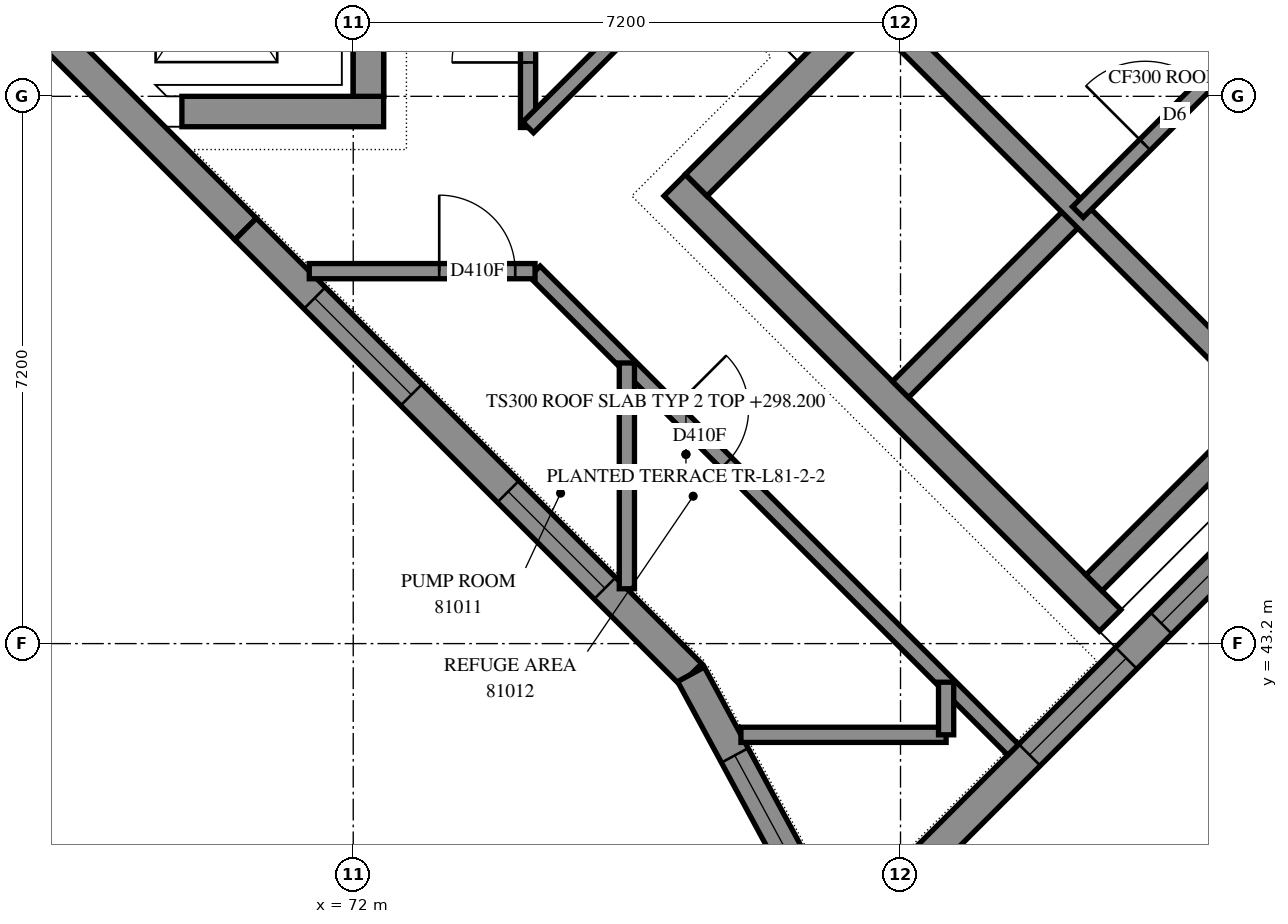
"""IFC4 building model, lengths in metres.
Left out: names, types, materials, properties, quantities, classifications, styles, units other than length and angle.
Written with IfcOpenShell. Run it as: python <this file> out.ifc"""

import sys

from ifc_helpers import new_model, si_unit, direction, frame, frame_2d, origin, place, context, subcontext, project, spatial, polyline, rectangle, outline, extrude, element, fill, save


model = new_model("IFC4")
c1 = context("Model", 3, precision=1e-05, world=origin(), true_north=direction((0.0, 1.0)))
c2 = subcontext(c1, "Body", "Model", "MODEL_VIEW")
j1 = project(units=[si_unit("LENGTHUNIT", "METRE"), si_unit("PLANEANGLEUNIT", "RADIAN")], contexts=[c1])
p1 = place(None, origin())
s1 = spatial("IfcSite", under=j1, at=p1, CompositionType="ELEMENT")
p2 = place(p1, origin())
s2 = spatial("IfcBuilding", under=s1, at=p2, CompositionType="ELEMENT")
p3 = place(p2, frame((0.0, 0.0, 298.2)))
s3 = spatial("IfcBuildingStorey", under=s2, at=p3, CompositionType="ELEMENT", Elevation=298.2)
p4 = place(p3, frame((69.746, 50.2, -0.3), z_axis=(0.0, 0.0, 1.0), x_axis=(1.0, 0.0, 0.0)))
e1 = element("IfcWall", 1, at=p4, inside=s3, PredefinedType="SHEAR", context=c2, shape_type="SweptSolid", body=[
    extrude(outline(polyline([(0.0, 0.0), (2.654, 0.0), (2.654, 3.1), (0.0, 3.1), (0.0, 0.0)])), frame((0.0, 0.2, 0.0), z_axis=(0.0, -1.0, 0.0), x_axis=(1.0, 0.0, 0.0)), (0.0, 0.0, 1.0), 0.4),
])
p5 = place(p3, frame((72.2, 50.4, -0.3), z_axis=(0.0, 0.0, 1.0), x_axis=(0.0, 1.0, 0.0)))
e2 = element("IfcWall", 2, at=p5, inside=s3, PredefinedType="SHEAR", context=c2, shape_type="SweptSolid", body=[
    extrude(outline(polyline([(0.0, 0.0), (14.4, 0.0), (14.4, 3.1), (0.0, 3.1), (0.0, 0.0)])), frame((0.0, 0.2, 0.0), z_axis=(0.0, -1.0, 0.0), x_axis=(1.0, 0.0, 0.0)), (0.0, 0.0, 1.0), 0.4),
])
p6 = place(p5, frame((4.55, 0.0, 0.3)))
e3 = element("IfcOpeningElement", 3, at=p6, cuts=e2, PredefinedType="OPENING", context=c2, shape_type="SweptSolid", body=[
    extrude(rectangle(XDim=1.1, YDim=2.1, at=frame_2d((0.55, 1.05))), frame((0.0, 0.21, 0.0), z_axis=(0.0, -1.0, 0.0), x_axis=(1.0, 0.0, 0.0)), (0.0, 0.0, 1.0), 0.42),
])
p7 = place(p5, frame((11.35, 0.0, 0.3)))
e4 = element("IfcOpeningElement", 4, at=p7, cuts=e2, PredefinedType="OPENING", context=c2, shape_type="SweptSolid", body=[
    extrude(rectangle(XDim=1.1, YDim=2.1, at=frame_2d((0.55, 1.05))), frame((0.0, 0.21, 0.0), z_axis=(0.0, -1.0, 0.0), x_axis=(1.0, 0.0, 0.0)), (0.0, 0.0, 1.0), 0.42),
])
p8 = place(p3, frame((76.23, 49.231, -0.3), z_axis=(0.0, 0.0, 1.0), x_axis=(0.7071006083, -0.707112954, 0.0)))
e5 = element("IfcWall", 5, at=p8, inside=s3, PredefinedType="SHEAR", context=c2, shape_type="SweptSolid", body=[
    extrude(outline(polyline([(0.0, 0.0), (8.1, 0.0), (8.1, 3.1), (0.0, 3.1), (0.0, 0.0)])), frame((0.0, 0.2, 0.0), z_axis=(0.0, -1.0, 0.0), x_axis=(1.0, 0.0, 0.0)), (0.0, 0.0, 1.0), 0.4),
])
p9 = place(p3, frame((76.513, 49.231, -0.3), z_axis=(0.0, 0.0, 1.0), x_axis=(0.7071067812, 0.7071067812, 0.0)))
e6 = element("IfcWall", 6, at=p9, inside=s3, PredefinedType="SHEAR", context=c2, shape_type="SweptSolid", body=[
    extrude(outline(polyline([(0.0, 0.0), (14.4, 0.0), (14.4, 3.1), (0.0, 3.1), (0.0, 0.0)])), frame((0.0, 0.2, 0.0), z_axis=(0.0, -1.0, 0.0), x_axis=(1.0, 0.0, 0.0)), (0.0, 0.0, 1.0), 0.4),
])
p10 = place(p9, frame((4.55, 0.0, 0.3)))
e7 = element("IfcOpeningElement", 7, at=p10, cuts=e6, PredefinedType="OPENING", context=c2, shape_type="SweptSolid", body=[
    extrude(rectangle(XDim=1.1, YDim=2.1, at=frame_2d((0.55, 1.05))), frame((0.0, 0.21, 0.0), z_axis=(0.0, -1.0, 0.0), x_axis=(1.0, 0.0, 0.0)), (0.0, 0.0, 1.0), 0.42),
])
p11 = place(p9, frame((11.35, 0.0, 0.3)))
e8 = element("IfcOpeningElement", 8, at=p11, cuts=e6, PredefinedType="OPENING", context=c2, shape_type="SweptSolid", body=[
    extrude(rectangle(XDim=1.1, YDim=2.1, at=frame_2d((0.55, 1.05))), frame((0.0, 0.21, 0.0), z_axis=(0.0, -1.0, 0.0), x_axis=(1.0, 0.0, 0.0)), (0.0, 0.0, 1.0), 0.42),
])
p12 = place(p3, frame((79.2, 46.544, 0.0), z_axis=(0.0, 0.0, 1.0), x_axis=(0.7071219326, 0.7070916295, 0.0)))
e9 = element("IfcWall", 9, at=p12, inside=s3, PredefinedType="SOLIDWALL", context=c2, shape_type="SweptSolid", body=[
    extrude(outline(polyline([(0.0, 0.0), (3.3, 0.0), (3.3, 3.5), (0.0, 3.5), (0.0, 0.0)])), frame((0.0, 0.15, 0.0), z_axis=(0.0, -1.0, 0.0), x_axis=(1.0, 0.0, 0.0)), (0.0, 0.0, 1.0), 0.3),
])
p13 = place(p3, frame((81.746, 43.999, 0.0), z_axis=(0.0, 0.0, 1.0), x_axis=(0.7071067812, 0.7071067812, 0.0)))
e10 = element("IfcWall", 10, at=p13, inside=s3, PredefinedType="SOLIDWALL", context=c2, shape_type="SweptSolid", body=[
    extrude(outline(polyline([(0.0, 0.0), (3.3, 0.0), (3.3, 3.5), (0.0, 3.5), (0.0, 0.0)])), frame((0.0, 0.15, 0.0), z_axis=(0.0, -1.0, 0.0), x_axis=(1.0, 0.0, 0.0)), (0.0, 0.0, 1.0), 0.3),
])
p14 = place(p3, frame((78.988, 51.423, 0.0), z_axis=(0.0, 0.0, 1.0), x_axis=(0.7071067812, -0.7071067812, 0.0)))
e11 = element("IfcWall", 11, at=p14, inside=s3, PredefinedType="SOLIDWALL", context=c2, shape_type="SweptSolid", body=[
    extrude(outline(polyline([(0.0, 0.0), (14.4, 0.0), (14.4, 3.5), (0.0, 3.5), (0.0, 0.0)])), frame((0.0, 0.15, 0.0), z_axis=(0.0, -1.0, 0.0), x_axis=(1.0, 0.0, 0.0)), (0.0, 0.0, 1.0), 0.3),
])
p15 = place(p3, frame((81.534, 53.969, 0.0), z_axis=(0.0, 0.0, 1.0), x_axis=(0.707103309, -0.7071102534, 0.0)))
e12 = element("IfcWall", 12, at=p15, inside=s3, PredefinedType="SOLIDWALL", context=c2, shape_type="SweptSolid", body=[
    extrude(outline(polyline([(0.0, 0.0), (14.4, 0.0), (14.4, 3.5), (0.0, 3.5), (0.0, 0.0)])), frame((0.0, 0.15, 0.0), z_axis=(0.0, -1.0, 0.0), x_axis=(1.0, 0.0, 0.0)), (0.0, 0.0, 1.0), 0.3),
])
p16 = place(p15, frame((12.05, 0.0, 0.0)))
e13 = element("IfcOpeningElement", 13, at=p16, cuts=e12, PredefinedType="OPENING", context=c2, shape_type="SweptSolid", body=[
    extrude(rectangle(XDim=1.1, YDim=2.1, at=frame_2d((0.55, 1.05))), frame((0.0, 0.16, 0.0), z_axis=(0.0, -1.0, 0.0), x_axis=(1.0, 0.0, 0.0)), (0.0, 0.0, 1.0), 0.32),
])
p17 = place(p3, frame((64.726, 54.513, 0.0), z_axis=(0.0, 0.0, 1.0), x_axis=(0.7071067812, -0.7071067812, 0.0)))
e14 = element("IfcWall", 14, at=p17, inside=s3, PredefinedType="SOLIDWALL", context=c2, shape_type="SweptSolid", body=[
    extrude(outline(polyline([(0.029, -0.2), (8.285, -0.2), (8.285, 0.2), (-0.029, 0.2), (0.029, -0.2)])), origin(), (0.0, 0.0, 1.0), 3.5),
])
p18 = place(p17, frame((2.369, 0.0, 0.7)))
e15 = element("IfcOpeningElement", 15, at=p18, cuts=e14, PredefinedType="OPENING", context=c2, shape_type="SweptSolid", body=[
    extrude(rectangle(XDim=1.8, YDim=2.2, at=frame_2d((0.9, 1.1))), frame((0.0, 0.21, 0.0), z_axis=(0.0, -1.0, 0.0), x_axis=(1.0, 0.0, 0.0)), (0.0, 0.0, 1.0), 0.42),
])
p19 = place(p3, frame((70.585, 48.654, 0.0), z_axis=(0.0, 0.0, 1.0), x_axis=(0.707112816, -0.7071007463, 0.0)))
e16 = element("IfcWall", 16, at=p19, inside=s3, PredefinedType="SOLIDWALL", context=c2, shape_type="SweptSolid", body=[
    extrude(outline(polyline([(0.0, -0.2), (8.256, -0.2), (8.314, 0.2), (0.0, 0.2), (0.0, -0.2)])), origin(), (0.0, 0.0, 1.0), 3.5),
])
p20 = place(p19, frame((1.284, 0.0, 0.7)))
e17 = element("IfcOpeningElement", 17, at=p20, cuts=e16, PredefinedType="OPENING", context=c2, shape_type="SweptSolid", body=[
    extrude(rectangle(XDim=1.8, YDim=2.2, at=frame_2d((0.9, 1.1))), frame((0.0, 0.21, 0.0), z_axis=(0.0, -1.0, 0.0), x_axis=(1.0, 0.0, 0.0)), (0.0, 0.0, 1.0), 0.42),
])
p21 = place(p19, frame((4.884, 0.0, 0.7)))
e18 = element("IfcOpeningElement", 18, at=p21, cuts=e16, PredefinedType="OPENING", context=c2, shape_type="SweptSolid", body=[
    extrude(rectangle(XDim=1.8, YDim=2.2, at=frame_2d((0.9, 1.1))), frame((0.0, 0.21, 0.0), z_axis=(0.0, -1.0, 0.0), x_axis=(1.0, 0.0, 0.0)), (0.0, 0.0, 1.0), 0.42),
])
p22 = place(p3, frame((76.443, 42.796, 0.0), z_axis=(0.0, 0.0, 1.0), x_axis=(0.4757319228, -0.8795903237, 0.0)))
e19 = element("IfcWall", 19, at=p22, inside=s3, PredefinedType="SOLIDWALL", context=c2, shape_type="SweptSolid", body=[
    extrude(outline(polyline([(0.029, -0.2), (4.337, -0.2), (3.8, 0.2), (-0.029, 0.2), (0.029, -0.2)])), origin(), (0.0, 0.0, 1.0), 3.5),
])
p23 = place(p22, frame((1.212, 0.0, 0.7)))
e20 = element("IfcOpeningElement", 20, at=p23, cuts=e19, PredefinedType="OPENING", context=c2, shape_type="SweptSolid", body=[
    extrude(rectangle(XDim=1.8, YDim=2.2, at=frame_2d((0.9, 1.1))), frame((0.0, 0.21, 0.0), z_axis=(0.0, -1.0, 0.0), x_axis=(1.0, 0.0, 0.0)), (0.0, 0.0, 1.0), 0.42),
])
p24 = place(p3, frame((78.379, 39.217, 0.0), z_axis=(0.0, 0.0, 1.0), x_axis=(0.7071127608, 0.7071008016, 0.0)))
e21 = element("IfcWall", 21, at=p24, inside=s3, PredefinedType="SOLIDWALL", context=c2, shape_type="SweptSolid", body=[
    extrude(outline(polyline([(-0.268, -0.2), (8.162, -0.2), (8.162, 0.2), (0.268, 0.2), (-0.268, -0.2)])), origin(), (0.0, 0.0, 1.0), 3.5),
])
p25 = place(p24, frame((3.562, 0.0, 0.7)))
e22 = element("IfcOpeningElement", 22, at=p25, cuts=e21, PredefinedType="OPENING", context=c2, shape_type="SweptSolid", body=[
    extrude(rectangle(XDim=1.8, YDim=2.2, at=frame_2d((0.9, 1.1))), frame((0.0, 0.21, 0.0), z_axis=(0.0, -1.0, 0.0), x_axis=(1.0, 0.0, 0.0)), (0.0, 0.0, 1.0), 0.42),
])
p26 = place(p24, frame((6.012, 0.0, 0.7)))
e23 = element("IfcOpeningElement", 23, at=p26, cuts=e21, PredefinedType="OPENING", context=c2, shape_type="SweptSolid", body=[
    extrude(rectangle(XDim=1.8, YDim=2.2, at=frame_2d((0.9, 1.1))), frame((0.0, 0.21, 0.0), z_axis=(0.0, -1.0, 0.0), x_axis=(1.0, 0.0, 0.0)), (0.0, 0.0, 1.0), 0.42),
])
p27 = place(p3, frame((81.534, 48.878, 0.0), z_axis=(0.0, 0.0, 1.0), x_axis=(0.707092892, 0.7071206701, 0.0)))
e24 = element("IfcWall", 24, at=p27, inside=s3, PredefinedType="PARTITIONING", context=c2, shape_type="SweptSolid", body=[
    extrude(outline(polyline([(0.0, 0.0), (3.6, 0.0), (3.6, 3.5), (0.0, 3.5), (0.0, 0.0)])), frame((0.0, 0.1, 0.0), z_axis=(0.0, -1.0, 0.0), x_axis=(1.0, 0.0, 0.0)), (0.0, 0.0, 1.0), 0.2),
])
p28 = place(p27, frame((1.25, 0.0, 0.0)))
e25 = element("IfcOpeningElement", 25, at=p28, cuts=e24, PredefinedType="OPENING", context=c2, shape_type="SweptSolid", body=[
    extrude(rectangle(XDim=1.1, YDim=2.1, at=frame_2d((0.55, 1.05))), frame((0.0, 0.11, 0.0), z_axis=(0.0, -1.0, 0.0), x_axis=(1.0, 0.0, 0.0)), (0.0, 0.0, 1.0), 0.22),
])
p29 = place(p3, frame((74.3, 49.99, 0.0), z_axis=(0.0, 0.0, 1.0), x_axis=(0.0, 1.0, 0.0)))
e26 = element("IfcWall", 26, at=p29, inside=s3, PredefinedType="PARTITIONING", context=c2, shape_type="SweptSolid", body=[
    extrude(rectangle(XDim=10.29, YDim=0.2, at=frame_2d((5.145, 0.0))), origin(), (0.0, 0.0, 1.0), 3.5),
])
p30 = place(p29, frame((0.856, 0.0, 0.0)))
e27 = element("IfcOpeningElement", 27, at=p30, cuts=e26, PredefinedType="OPENING", context=c2, shape_type="SweptSolid", body=[
    extrude(rectangle(XDim=1.0, YDim=2.1, at=frame_2d((0.5, 1.05))), frame((0.0, 0.11, 0.0), z_axis=(0.0, -1.0, 0.0), x_axis=(1.0, 0.0, 0.0)), (0.0, 0.0, 1.0), 0.22),
])
p31 = place(p3, frame((74.388, 48.096, 0.0), z_axis=(0.0, 0.0, 1.0), x_axis=(0.7071067812, -0.7071067812, 0.0)))
e28 = element("IfcWall", 28, at=p31, inside=s3, PredefinedType="PARTITIONING", context=c2, shape_type="SweptSolid", body=[
    extrude(rectangle(XDim=8.9, YDim=0.2, at=frame_2d((4.45, 0.0))), origin(), (0.0, 0.0, 1.0), 3.5),
])
p32 = place(p31, frame((2.564, 0.0, 0.0)))
e29 = element("IfcOpeningElement", 29, at=p32, cuts=e28, PredefinedType="OPENING", context=c2, shape_type="SweptSolid", body=[
    extrude(rectangle(XDim=1.0, YDim=2.1, at=frame_2d((0.5, 1.05))), frame((0.0, 0.11, 0.0), z_axis=(0.0, -1.0, 0.0), x_axis=(1.0, 0.0, 0.0)), (0.0, 0.0, 1.0), 0.22),
])
p33 = place(p3, frame((74.301, 49.991, 0.0), z_axis=(0.0, 0.0, 1.0), x_axis=(0.7071067812, 0.7071067812, 0.0)))
e30 = element("IfcWall", 30, at=p33, inside=s3, PredefinedType="PARTITIONING", context=c2, shape_type="SweptSolid", body=[
    extrude(rectangle(XDim=7.275, YDim=0.2, at=frame_2d((3.637, 0.0))), origin(), (0.0, 0.0, 1.0), 3.5),
])
p34 = place(p33, frame((2.615, 0.0, 0.0)))
e31 = element("IfcOpeningElement", 31, at=p34, cuts=e30, PredefinedType="OPENING", context=c2, shape_type="SweptSolid", body=[
    extrude(rectangle(XDim=1.0, YDim=2.1, at=frame_2d((0.5, 1.05))), frame((0.0, 0.11, 0.0), z_axis=(0.0, -1.0, 0.0), x_axis=(1.0, 0.0, 0.0)), (0.0, 0.0, 1.0), 0.22),
])
p35 = place(p3, frame((77.101, 42.0, 0.0), z_axis=(0.0, 0.0, 1.0), x_axis=(1.0, 0.0, 0.0)))
e32 = element("IfcWall", 32, at=p35, inside=s3, PredefinedType="PARTITIONING", context=c2, shape_type="SweptSolid", body=[
    extrude(rectangle(XDim=2.699, YDim=0.2, at=frame_2d((1.35, 0.0))), origin(), (0.0, 0.0, 1.0), 3.5),
])
p36 = place(p3, frame((79.8, 42.0, 0.0), z_axis=(0.0, 0.0, 1.0), x_axis=(0.0, 1.0, 0.0)))
e33 = element("IfcWall", 33, at=p36, inside=s3, PredefinedType="PARTITIONING", context=c2, shape_type="SweptSolid", body=[
    extrude(rectangle(XDim=0.692, YDim=0.2, at=frame_2d((0.346, 0.0))), origin(), (0.0, 0.0, 1.0), 3.5),
])
p37 = place(p3, frame((75.6, 43.922, 0.0), z_axis=(0.0, 0.0, 1.0), x_axis=(0.0, 1.0, 0.0)))
e34 = element("IfcWall", 34, at=p37, inside=s3, PredefinedType="PARTITIONING", context=c2, shape_type="SweptSolid", body=[
    extrude(outline(polyline([(0.0, -0.1), (2.97, -0.1), (2.97, 0.1), (0.0, 0.1), (0.0, -0.1)])), origin(), (0.0, 0.0, 1.0), 3.5),
])
p38 = place(p3, frame((71.422, 48.1, 0.0), z_axis=(0.0, 0.0, 1.0), x_axis=(1.0, 0.0, 0.0)))
e35 = element("IfcWall", 35, at=p38, inside=s3, PredefinedType="PARTITIONING", context=c2, shape_type="SweptSolid", body=[
    extrude(outline(polyline([(0.0, -0.1), (2.97, -0.1), (2.97, 0.1), (0.0, 0.1), (0.0, -0.1)])), origin(), (0.0, 0.0, 1.0), 3.5),
])
p39 = place(p38, frame((1.71, 0.0, 0.0)))
e36 = element("IfcOpeningElement", 36, at=p39, cuts=e35, PredefinedType="OPENING", context=c2, shape_type="SweptSolid", body=[
    extrude(rectangle(XDim=1.0, YDim=2.1, at=frame_2d((0.5, 1.05))), frame((0.0, 0.11, 0.0), z_axis=(0.0, -1.0, 0.0), x_axis=(1.0, 0.0, 0.0)), (0.0, 0.0, 1.0), 0.22),
])
p40 = place(p20, origin())
e37 = element("IfcWindow", 37, at=p40, inside=s3, PartitioningType="SINGLE_PANEL", PredefinedType="WINDOW", context=c2, shape_type="SweptSolid", body=[
    extrude(rectangle(XDim=1.8, YDim=2.2, at=frame_2d((0.9, 1.1))), frame((0.0, 0.08, 0.0), z_axis=(0.0, -1.0, 0.0), x_axis=(1.0, 0.0, 0.0)), (0.0, 0.0, 1.0), 0.06),
])
fill(e17, e37)
p41 = place(p21, origin())
e38 = element("IfcWindow", 38, at=p41, inside=s3, PartitioningType="SINGLE_PANEL", PredefinedType="WINDOW", context=c2, shape_type="SweptSolid", body=[
    extrude(rectangle(XDim=1.8, YDim=2.2, at=frame_2d((0.9, 1.1))), frame((0.0, 0.08, 0.0), z_axis=(0.0, -1.0, 0.0), x_axis=(1.0, 0.0, 0.0)), (0.0, 0.0, 1.0), 0.06),
])
fill(e18, e38)
p42 = place(p23, origin())
e39 = element("IfcWindow", 39, at=p42, inside=s3, PartitioningType="SINGLE_PANEL", PredefinedType="WINDOW", context=c2, shape_type="SweptSolid", body=[
    extrude(rectangle(XDim=1.8, YDim=2.2, at=frame_2d((0.9, 1.1))), frame((0.0, 0.08, 0.0), z_axis=(0.0, -1.0, 0.0), x_axis=(1.0, 0.0, 0.0)), (0.0, 0.0, 1.0), 0.06),
])
fill(e20, e39)
p43 = place(p25, origin())
e40 = element("IfcWindow", 40, at=p43, inside=s3, PartitioningType="SINGLE_PANEL", PredefinedType="WINDOW", context=c2, shape_type="SweptSolid", body=[
    extrude(rectangle(XDim=1.8, YDim=2.2, at=frame_2d((0.9, 1.1))), frame((0.0, 0.08, 0.0), z_axis=(0.0, -1.0, 0.0), x_axis=(1.0, 0.0, 0.0)), (0.0, 0.0, 1.0), 0.06),
])
fill(e22, e40)
p44 = place(p26, origin())
e41 = element("IfcWindow", 41, at=p44, inside=s3, PartitioningType="SINGLE_PANEL", PredefinedType="WINDOW", context=c2, shape_type="SweptSolid", body=[
    extrude(rectangle(XDim=1.8, YDim=2.2, at=frame_2d((0.9, 1.1))), frame((0.0, 0.08, 0.0), z_axis=(0.0, -1.0, 0.0), x_axis=(1.0, 0.0, 0.0)), (0.0, 0.0, 1.0), 0.06),
])
fill(e23, e41)
p45 = place(p28, origin())
e42 = element("IfcDoor", 42, at=p45, inside=s3, OperationType="DOUBLE_DOOR_SINGLE_SWING", PredefinedType="DOOR", context=c2, shape_type="SweptSolid", body=[
    extrude(rectangle(XDim=1.1, YDim=2.1, at=frame_2d((0.55, 1.05))), frame((0.0, 0.025, 0.0), z_axis=(0.0, -1.0, 0.0), x_axis=(1.0, 0.0, 0.0)), (0.0, 0.0, 1.0), 0.05),
])
fill(e25, e42)
p46 = place(p39, origin())
e43 = element("IfcDoor", 43, at=p46, inside=s3, OperationType="SINGLE_SWING_LEFT", PredefinedType="DOOR", context=c2, shape_type="SweptSolid", body=[
    extrude(rectangle(XDim=1.0, YDim=2.1, at=frame_2d((0.5, 1.05))), frame((0.0, 0.025, 0.0), z_axis=(0.0, -1.0, 0.0), x_axis=(1.0, 0.0, 0.0)), (0.0, 0.0, 1.0), 0.05),
])
fill(e36, e43)
p47 = place(p32, origin())
e44 = element("IfcDoor", 44, at=p47, inside=s3, OperationType="SINGLE_SWING_RIGHT", PredefinedType="DOOR", context=c2, shape_type="SweptSolid", body=[
    extrude(rectangle(XDim=1.0, YDim=2.1, at=frame_2d((0.5, 1.05))), frame((0.0, 0.025, 0.0), z_axis=(0.0, -1.0, 0.0), x_axis=(1.0, 0.0, 0.0)), (0.0, 0.0, 1.0), 0.05),
])
fill(e29, e44)
p48 = place(p30, origin())
e45 = element("IfcDoor", 45, at=p48, inside=s3, OperationType="SINGLE_SWING_LEFT", PredefinedType="DOOR", context=c2, shape_type="SweptSolid", body=[
    extrude(rectangle(XDim=1.0, YDim=2.1, at=frame_2d((0.5, 1.05))), frame((0.0, 0.025, 0.0), z_axis=(0.0, -1.0, 0.0), x_axis=(1.0, 0.0, 0.0)), (0.0, 0.0, 1.0), 0.05),
])
fill(e27, e45)
save(model, sys.argv[1])
